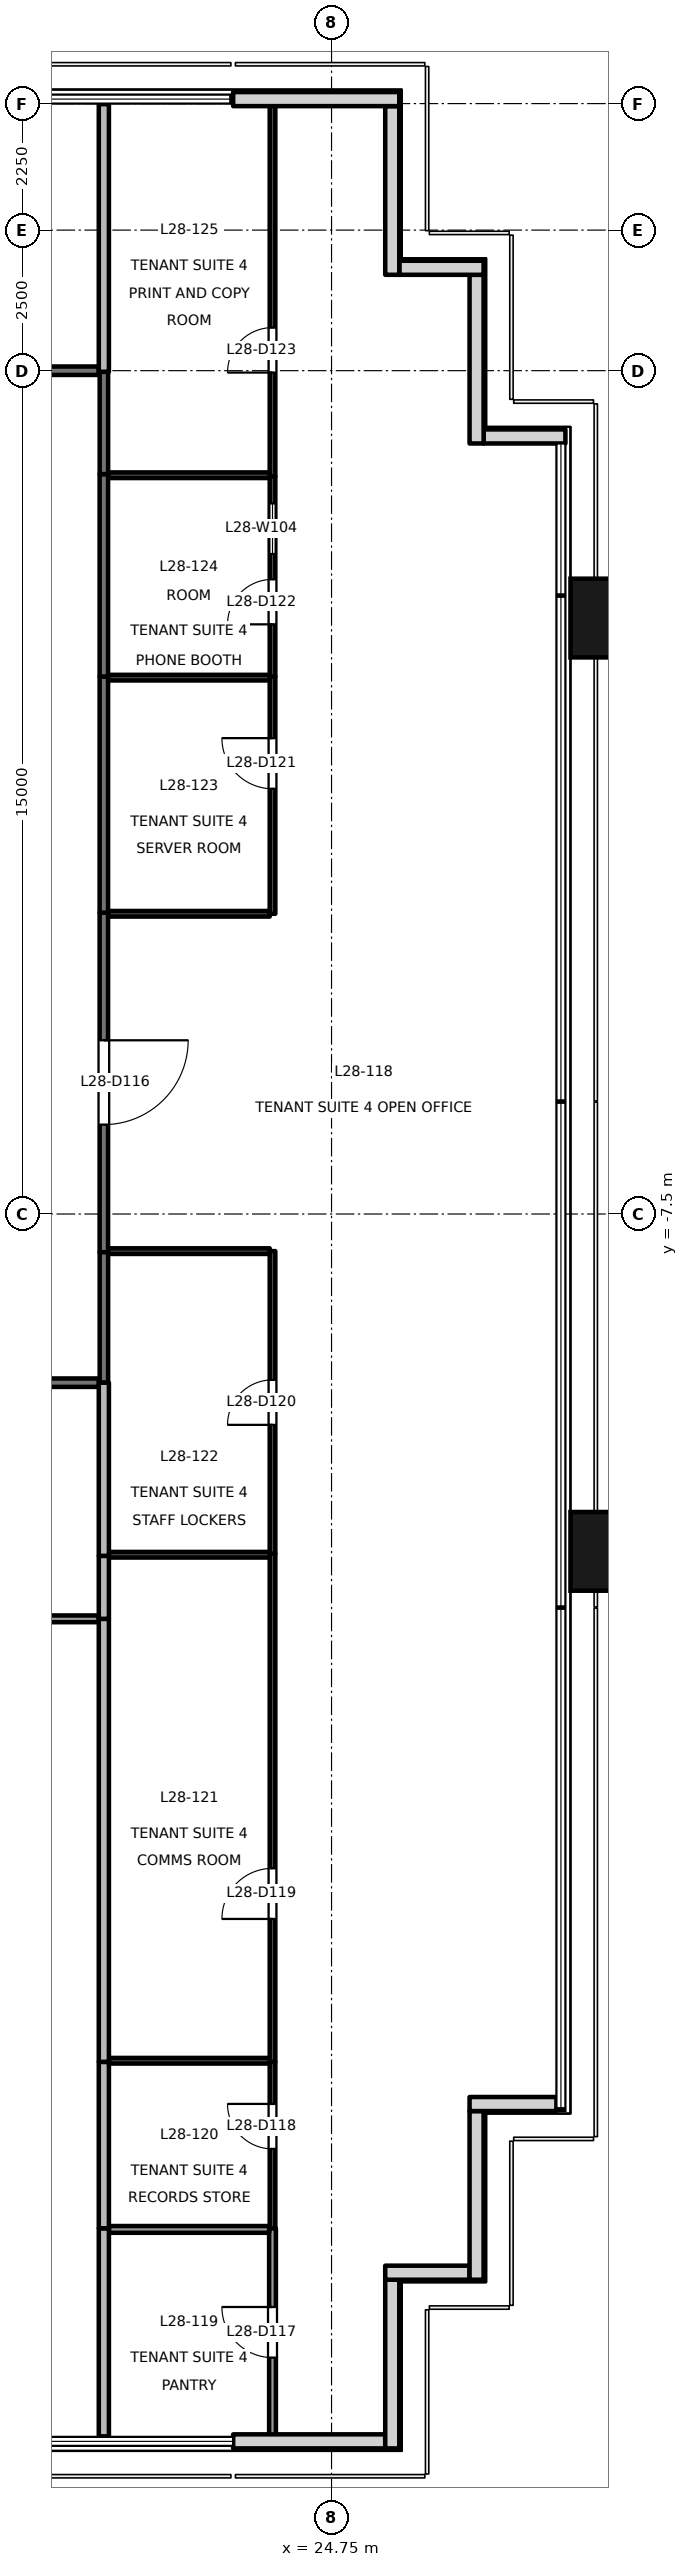
"""IFC4 building model, lengths in metres.
Left out: names, types, materials, properties, quantities, classifications, styles, units other than length and angle.
Written with IfcOpenShell. Run it as: python <this file> out.ifc"""

import sys

from ifc_helpers import new_model, si_unit, direction, frame, frame_2d, origin, origin_2d, place, context, subcontext, project, spatial, rectangle, extrude, element, fill, save


model = new_model("IFC4")
c1 = context("Model", 3, precision=1e-05, world=origin(), true_north=direction((0.0, 1.0)))
c2 = subcontext(c1, "Body", "Model", "MODEL_VIEW")
j1 = project(units=[si_unit("LENGTHUNIT", "METRE"), si_unit("PLANEANGLEUNIT", "RADIAN")], contexts=[c1])
p1 = place(None, origin())
s1 = spatial("IfcSite", under=j1, at=p1, CompositionType="ELEMENT")
p2 = place(p1, origin())
s2 = spatial("IfcBuilding", under=s1, at=p2, CompositionType="ELEMENT")
p3 = place(p2, frame((0.0, 0.0, 126.1)))
s3 = spatial("IfcBuildingStorey", under=s2, at=p3, CompositionType="ELEMENT", Elevation=126.1)
for number, where, z_axis, x_axis in (
    (1, (29.9, -13.5, -0.2), (0.0, 0.0, 1.0), (0.0, 1.0, 0.0)),
    (2, (29.9, 3.1, -0.2), (0.0, 0.0, 1.0), (0.0, 1.0, 0.0)),
):
    element("IfcColumn", number, at=place(p3, frame(where, z_axis=z_axis, x_axis=x_axis)), inside=s3, PredefinedType="COLUMN", context=c2, shape_type="SweptSolid", body=[
        extrude(rectangle(XDim=1.4, YDim=1.8, at=origin_2d()), origin(), (0.0, 0.0, 1.0), 4.0),
    ])
p4 = place(p3, frame((23.0, -29.33, 0.0), z_axis=(0.0, 0.0, 1.0), x_axis=(1.0, 0.0, 0.0)))
e3 = element("IfcWall", 3, at=p4, inside=s3, PredefinedType="SOLIDWALL", context=c2, shape_type="SweptSolid", body=[
    extrude(rectangle(XDim=2.705, YDim=0.25, at=frame_2d((1.353, 0.0))), origin(), (0.0, 0.0, 1.0), 3.8),
])
p5 = place(p3, frame((25.83, -29.455, 0.0), z_axis=(0.0, 0.0, 1.0), x_axis=(0.0, 1.0, 0.0)))
e4 = element("IfcWall", 4, at=p5, inside=s3, PredefinedType="SOLIDWALL", context=c2, shape_type="SweptSolid", body=[
    extrude(rectangle(XDim=3.0, YDim=0.25, at=frame_2d((1.5, 0.0))), origin(), (0.0, 0.0, 1.0), 3.8),
])
p6 = place(p3, frame((25.705, -26.33, 0.0), z_axis=(0.0, 0.0, 1.0), x_axis=(1.0, 0.0, 0.0)))
e5 = element("IfcWall", 5, at=p6, inside=s3, PredefinedType="SOLIDWALL", context=c2, shape_type="SweptSolid", body=[
    extrude(rectangle(XDim=1.5, YDim=0.25, at=frame_2d((0.75, 0.0))), origin(), (0.0, 0.0, 1.0), 3.8),
])
p7 = place(p3, frame((27.33, -26.455, 0.0), z_axis=(0.0, 0.0, 1.0), x_axis=(0.0, 1.0, 0.0)))
e6 = element("IfcWall", 6, at=p7, inside=s3, PredefinedType="SOLIDWALL", context=c2, shape_type="SweptSolid", body=[
    extrude(rectangle(XDim=3.0, YDim=0.25, at=frame_2d((1.5, 0.0))), origin(), (0.0, 0.0, 1.0), 3.8),
])
p8 = place(p3, frame((27.205, -23.33, 0.0), z_axis=(0.0, 0.0, 1.0), x_axis=(1.0, 0.0, 0.0)))
e7 = element("IfcWall", 7, at=p8, inside=s3, PredefinedType="SOLIDWALL", context=c2, shape_type="SweptSolid", body=[
    extrude(rectangle(XDim=1.545, YDim=0.25, at=frame_2d((0.772, 0.0))), origin(), (0.0, 0.0, 1.0), 3.8),
])
p9 = place(p3, frame((28.91, 6.33, 0.0), z_axis=(0.0, 0.0, 1.0), x_axis=(-1.0, 0.0, 0.0)))
e8 = element("IfcWall", 8, at=p9, inside=s3, PredefinedType="SOLIDWALL", context=c2, shape_type="SweptSolid", body=[
    extrude(rectangle(XDim=1.455, YDim=0.25, at=frame_2d((0.728, 0.0))), origin(), (0.0, 0.0, 1.0), 3.8),
])
p10 = place(p3, frame((27.33, 6.205, 0.0), z_axis=(0.0, 0.0, 1.0), x_axis=(0.0, 1.0, 0.0)))
e9 = element("IfcWall", 9, at=p10, inside=s3, PredefinedType="SOLIDWALL", context=c2, shape_type="SweptSolid", body=[
    extrude(rectangle(XDim=3.0, YDim=0.25, at=frame_2d((1.5, 0.0))), origin(), (0.0, 0.0, 1.0), 3.8),
])
p11 = place(p3, frame((27.455, 9.33, 0.0), z_axis=(0.0, 0.0, 1.0), x_axis=(-1.0, 0.0, 0.0)))
e10 = element("IfcWall", 10, at=p11, inside=s3, PredefinedType="SOLIDWALL", context=c2, shape_type="SweptSolid", body=[
    extrude(rectangle(XDim=1.5, YDim=0.25, at=frame_2d((0.75, 0.0))), origin(), (0.0, 0.0, 1.0), 3.8),
])
p12 = place(p3, frame((25.83, 9.205, 0.0), z_axis=(0.0, 0.0, 1.0), x_axis=(0.0, 1.0, 0.0)))
e11 = element("IfcWall", 11, at=p12, inside=s3, PredefinedType="SOLIDWALL", context=c2, shape_type="SweptSolid", body=[
    extrude(rectangle(XDim=3.0, YDim=0.25, at=frame_2d((1.5, 0.0))), origin(), (0.0, 0.0, 1.0), 3.8),
])
p13 = place(p3, frame((25.955, 12.33, 0.0), z_axis=(0.0, 0.0, 1.0), x_axis=(-1.0, 0.0, 0.0)))
e12 = element("IfcWall", 12, at=p13, inside=s3, PredefinedType="SOLIDWALL", context=c2, shape_type="SweptSolid", body=[
    extrude(rectangle(XDim=2.955, YDim=0.25, at=frame_2d((1.478, 0.0))), origin(), (0.0, 0.0, 1.0), 3.8),
])
p14 = place(p3, frame((20.61, -10.5, 0.0), z_axis=(0.0, 0.0, 1.0), x_axis=(-1.0, 0.0, 0.0)))
e13 = element("IfcWall", 13, at=p14, inside=s3, PredefinedType="PARTITIONING", context=c2, shape_type="SweptSolid", body=[
    extrude(rectangle(XDim=8.463, YDim=0.15, at=frame_2d((4.231, 0.0))), origin(), (0.0, 0.0, 1.0), 2.9),
])
p15 = place(p3, frame((20.7, -2.14, 0.0), z_axis=(0.0, 0.0, 1.0), x_axis=(0.0, -1.0, 0.0)))
e14 = element("IfcWall", 14, at=p15, inside=s3, PredefinedType="PARTITIONING", context=c2, shape_type="SweptSolid", body=[
    extrude(rectangle(XDim=6.04, YDim=0.15, at=frame_2d((3.02, 0.0))), origin(), (0.0, 0.0, 1.0), 3.3),
])
p16 = place(p15, frame((2.27, 0.0, 0.0)))
e15 = element("IfcOpeningElement", 15, at=p16, cuts=e14, PredefinedType="OPENING", context=c2, shape_type="SweptSolid", body=[
    extrude(rectangle(XDim=1.5, YDim=2.1, at=frame_2d((0.75, 1.05))), frame((0.0, 0.085, 0.0), z_axis=(0.0, -1.0, 0.0), x_axis=(1.0, 0.0, 0.0)), (0.0, 0.0, 1.0), 0.171),
])
p17 = place(p3, frame((20.701, -8.18, 0.0), z_axis=(0.0, 0.0, 1.0), x_axis=(0.0, -1.0, 0.0)))
e16 = element("IfcWall", 16, at=p17, inside=s3, PredefinedType="PARTITIONING", context=c2, shape_type="SweptSolid", body=[
    extrude(rectangle(XDim=2.32, YDim=0.15, at=frame_2d((1.16, 0.0))), origin(), (0.0, 0.0, 1.0), 3.8),
])
p18 = place(p3, frame((20.7, 2.06, 0.0), z_axis=(0.0, 0.0, 1.0), x_axis=(0.0, -1.0, 0.0)))
e17 = element("IfcWall", 17, at=p18, inside=s3, PredefinedType="PARTITIONING", context=c2, shape_type="SweptSolid", body=[
    extrude(rectangle(XDim=4.2, YDim=0.15, at=frame_2d((2.1, 0.0))), origin(), (0.0, 0.0, 1.0), 3.3),
])
p19 = place(p3, frame((20.7, 5.66, 0.0), z_axis=(0.0, 0.0, 1.0), x_axis=(0.0, -1.0, 0.0)))
e18 = element("IfcWall", 18, at=p19, inside=s3, PredefinedType="PARTITIONING", context=c2, shape_type="SweptSolid", body=[
    extrude(rectangle(XDim=3.6, YDim=0.15, at=frame_2d((1.8, 0.0))), origin(), (0.0, 0.0, 1.0), 3.3),
])
p20 = place(p3, frame((20.701, 7.48, 0.0), z_axis=(0.0, 0.0, 1.0), x_axis=(0.0, -1.0, 0.0)))
e19 = element("IfcWall", 19, at=p20, inside=s3, PredefinedType="PARTITIONING", context=c2, shape_type="SweptSolid", body=[
    extrude(rectangle(XDim=1.82, YDim=0.15, at=frame_2d((0.91, 0.0))), origin(), (0.0, 0.0, 1.0), 3.8),
])
p21 = place(p3, frame((18.0, 7.499, 0.0), z_axis=(0.0, 0.0, 1.0), x_axis=(1.0, 0.0, 0.0)))
e20 = element("IfcWall", 20, at=p21, inside=s3, PredefinedType="PARTITIONING", context=c2, shape_type="SweptSolid", body=[
    extrude(rectangle(XDim=2.61, YDim=0.15, at=frame_2d((1.305, 0.0))), origin(), (0.0, 0.0, 1.0), 3.8),
])
p22 = place(p3, frame((12.167, -14.7, 0.0), z_axis=(0.0, 0.0, 1.0), x_axis=(1.0, 0.0, 0.0)))
e21 = element("IfcWall", 21, at=p22, inside=s3, PredefinedType="PARTITIONING", context=c2, shape_type="SweptSolid", body=[
    extrude(rectangle(XDim=8.443, YDim=0.12, at=frame_2d((4.222, 0.0))), origin(), (0.0, 0.0, 1.0), 2.9),
])
p23 = place(p22, frame((3.771, 0.0, 0.0)))
e22 = element("IfcOpeningElement", 22, at=p23, cuts=e21, PredefinedType="OPENING", context=c2, shape_type="SweptSolid", body=[
    extrude(rectangle(XDim=0.9, YDim=2.1, at=frame_2d((0.45, 1.05))), frame((0.0, 0.071, 0.0), z_axis=(0.0, -1.0, 0.0), x_axis=(1.0, 0.0, 0.0)), (0.0, 0.0, 1.0), 0.141),
])
p24 = place(p3, frame((20.7, -25.54, 0.0), z_axis=(0.0, 0.0, 1.0), x_axis=(0.0, -1.0, 0.0)))
e23 = element("IfcWall", 23, at=p24, inside=s3, PredefinedType="PARTITIONING", context=c2, shape_type="SweptSolid", body=[
    extrude(rectangle(XDim=3.7, YDim=0.18, at=frame_2d((1.85, 0.0))), origin(), (0.0, 0.0, 1.0), 3.8),
])
p25 = place(p3, frame((20.7, -22.58, 0.0), z_axis=(0.0, 0.0, 1.0), x_axis=(0.0, -1.0, 0.0)))
e24 = element("IfcWall", 24, at=p25, inside=s3, PredefinedType="PARTITIONING", context=c2, shape_type="SweptSolid", body=[
    extrude(rectangle(XDim=2.96, YDim=0.18, at=frame_2d((1.48, 0.0))), origin(), (0.0, 0.0, 1.0), 3.8),
])
p26 = place(p3, frame((20.7, -14.7, 0.0), z_axis=(0.0, 0.0, 1.0), x_axis=(0.0, -1.0, 0.0)))
e25 = element("IfcWall", 25, at=p26, inside=s3, PredefinedType="PARTITIONING", context=c2, shape_type="SweptSolid", body=[
    extrude(rectangle(XDim=7.88, YDim=0.18, at=frame_2d((3.94, 0.0))), origin(), (0.0, 0.0, 1.0), 3.8),
])
p27 = place(p3, frame((20.7, -13.58, 0.0), z_axis=(0.0, 0.0, 1.0), x_axis=(0.0, -1.0, 0.0)))
e26 = element("IfcWall", 26, at=p27, inside=s3, PredefinedType="PARTITIONING", context=c2, shape_type="SweptSolid", body=[
    extrude(rectangle(XDim=1.12, YDim=0.18, at=frame_2d((0.56, 0.0))), origin(), (0.0, 0.0, 1.0), 3.8),
])
p28 = place(p3, frame((20.7, -10.5, 0.0), z_axis=(0.0, 0.0, 1.0), x_axis=(0.0, -1.0, 0.0)))
e27 = element("IfcWall", 27, at=p28, inside=s3, PredefinedType="PARTITIONING", context=c2, shape_type="SweptSolid", body=[
    extrude(rectangle(XDim=3.08, YDim=0.18, at=frame_2d((1.54, 0.0))), origin(), (0.0, 0.0, 1.0), 3.8),
])
p29 = place(p3, frame((23.7, -29.24, 0.0), z_axis=(0.0, 0.0, 1.0), x_axis=(0.0, 1.0, 0.0)))
e28 = element("IfcWall", 28, at=p29, inside=s3, PredefinedType="PARTITIONING", context=c2, shape_type="SweptSolid", body=[
    extrude(rectangle(XDim=3.7, YDim=0.12, at=frame_2d((1.85, 0.0))), origin(), (0.0, 0.0, 1.0), 3.8),
])
p30 = place(p29, frame((1.4, 0.0, 0.0)))
e29 = element("IfcOpeningElement", 29, at=p30, cuts=e28, PredefinedType="OPENING", context=c2, shape_type="SweptSolid", body=[
    extrude(rectangle(XDim=0.9, YDim=2.1, at=frame_2d((0.45, 1.05))), frame((0.0, 0.071, 0.0), z_axis=(0.0, -1.0, 0.0), x_axis=(1.0, 0.0, 0.0)), (0.0, 0.0, 1.0), 0.141),
])
p31 = place(p3, frame((23.7, -25.54, 0.0), z_axis=(0.0, 0.0, 1.0), x_axis=(0.0, 1.0, 0.0)))
e30 = element("IfcWall", 30, at=p31, inside=s3, PredefinedType="PARTITIONING", context=c2, shape_type="SweptSolid", body=[
    extrude(rectangle(XDim=2.96, YDim=0.1, at=frame_2d((1.48, 0.0))), origin(), (0.0, 0.0, 1.0), 3.8),
])
p32 = place(p31, frame((1.412, 0.0, 0.0)))
e31 = element("IfcOpeningElement", 31, at=p32, cuts=e30, PredefinedType="OPENING", context=c2, shape_type="SweptSolid", body=[
    extrude(rectangle(XDim=0.8, YDim=2.1, at=frame_2d((0.4, 1.05))), frame((0.0, 0.061, 0.0), z_axis=(0.0, -1.0, 0.0), x_axis=(1.0, 0.0, 0.0)), (0.0, 0.0, 1.0), 0.121),
])
p33 = place(p3, frame((23.7, -22.58, 0.0), z_axis=(0.0, 0.0, 1.0), x_axis=(0.0, 1.0, 0.0)))
e32 = element("IfcWall", 32, at=p33, inside=s3, PredefinedType="PARTITIONING", context=c2, shape_type="SweptSolid", body=[
    extrude(rectangle(XDim=9.04, YDim=0.1, at=frame_2d((4.52, 0.0))), origin(), (0.0, 0.0, 1.0), 3.8),
])
p34 = place(p33, frame((2.542, 0.0, 0.0)))
e33 = element("IfcOpeningElement", 33, at=p34, cuts=e32, PredefinedType="OPENING", context=c2, shape_type="SweptSolid", body=[
    extrude(rectangle(XDim=0.9, YDim=2.1, at=frame_2d((0.45, 1.05))), frame((0.0, 0.061, 0.0), z_axis=(0.0, -1.0, 0.0), x_axis=(1.0, 0.0, 0.0)), (0.0, 0.0, 1.0), 0.121),
])
p35 = place(p3, frame((23.65, -8.16, 0.0), z_axis=(0.0, 0.0, 1.0), x_axis=(-1.0, 0.0, 0.0)))
e34 = element("IfcWall", 34, at=p35, inside=s3, PredefinedType="PARTITIONING", context=c2, shape_type="SweptSolid", body=[
    extrude(rectangle(XDim=2.875, YDim=0.1, at=frame_2d((1.438, 0.0))), origin(), (0.0, 0.0, 1.0), 3.8),
])
p36 = place(p3, frame((23.7, -13.54, 0.0), z_axis=(0.0, 0.0, 1.0), x_axis=(0.0, 1.0, 0.0)))
e35 = element("IfcWall", 35, at=p36, inside=s3, PredefinedType="PARTITIONING", context=c2, shape_type="SweptSolid", body=[
    extrude(rectangle(XDim=5.38, YDim=0.1, at=frame_2d((2.69, 0.0))), origin(), (0.0, 0.0, 1.0), 3.8),
])
p37 = place(p36, frame((2.29, 0.0, 0.0)))
e36 = element("IfcOpeningElement", 36, at=p37, cuts=e35, PredefinedType="OPENING", context=c2, shape_type="SweptSolid", body=[
    extrude(rectangle(XDim=0.8, YDim=2.1, at=frame_2d((0.4, 1.05))), frame((0.0, 0.061, 0.0), z_axis=(0.0, -1.0, 0.0), x_axis=(1.0, 0.0, 0.0)), (0.0, 0.0, 1.0), 0.121),
])
p38 = place(p3, frame((20.775, -2.16, 0.0), z_axis=(0.0, 0.0, 1.0), x_axis=(1.0, 0.0, 0.0)))
e37 = element("IfcWall", 37, at=p38, inside=s3, PredefinedType="PARTITIONING", context=c2, shape_type="SweptSolid", body=[
    extrude(rectangle(XDim=2.875, YDim=0.1, at=frame_2d((1.438, 0.0))), origin(), (0.0, 0.0, 1.0), 3.8),
])
p39 = place(p3, frame((23.7, -2.16, 0.0), z_axis=(0.0, 0.0, 1.0), x_axis=(0.0, 1.0, 0.0)))
e38 = element("IfcWall", 38, at=p39, inside=s3, PredefinedType="PARTITIONING", context=c2, shape_type="SweptSolid", body=[
    extrude(rectangle(XDim=4.22, YDim=0.1, at=frame_2d((2.11, 0.0))), origin(), (0.0, 0.0, 1.0), 3.3),
])
p40 = place(p39, frame((2.224, 0.0, 0.0)))
e39 = element("IfcOpeningElement", 39, at=p40, cuts=e38, PredefinedType="OPENING", context=c2, shape_type="SweptSolid", body=[
    extrude(rectangle(XDim=0.9, YDim=2.1, at=frame_2d((0.45, 1.05))), frame((0.0, 0.061, 0.0), z_axis=(0.0, -1.0, 0.0), x_axis=(1.0, 0.0, 0.0)), (0.0, 0.0, 1.0), 0.121),
])
p41 = place(p3, frame((23.7, 2.06, 0.0), z_axis=(0.0, 0.0, 1.0), x_axis=(0.0, 1.0, 0.0)))
e40 = element("IfcWall", 40, at=p41, inside=s3, PredefinedType="PARTITIONING", context=c2, shape_type="SweptSolid", body=[
    extrude(rectangle(XDim=3.56, YDim=0.1, at=frame_2d((1.78, 0.0))), origin(), (0.0, 0.0, 1.0), 3.3),
])
p42 = place(p41, frame((0.928, 0.0, 0.0)))
e41 = element("IfcOpeningElement", 41, at=p42, cuts=e40, PredefinedType="OPENING", context=c2, shape_type="SweptSolid", body=[
    extrude(rectangle(XDim=0.8, YDim=2.1, at=frame_2d((0.4, 1.05))), frame((0.0, 0.061, 0.0), z_axis=(0.0, -1.0, 0.0), x_axis=(1.0, 0.0, 0.0)), (0.0, 0.0, 1.0), 0.121),
])
p43 = place(p41, frame((2.179, 0.0, 0.9)))
e42 = element("IfcOpeningElement", 42, at=p43, cuts=e40, PredefinedType="OPENING", context=c2, shape_type="SweptSolid", body=[
    extrude(rectangle(XDim=0.9, YDim=1.2, at=frame_2d((0.45, 0.6))), frame((0.0, 0.061, 0.0), z_axis=(0.0, -1.0, 0.0), x_axis=(1.0, 0.0, 0.0)), (0.0, 0.0, 1.0), 0.121),
])
p44 = place(p3, frame((23.7, 5.62, 0.0), z_axis=(0.0, 0.0, 1.0), x_axis=(0.0, 1.0, 0.0)))
e43 = element("IfcWall", 43, at=p44, inside=s3, PredefinedType="PARTITIONING", context=c2, shape_type="SweptSolid", body=[
    extrude(rectangle(XDim=6.62, YDim=0.1, at=frame_2d((3.31, 0.0))), origin(), (0.0, 0.0, 1.0), 3.8),
])
p45 = place(p44, frame((1.846, 0.0, 0.0)))
e44 = element("IfcOpeningElement", 44, at=p45, cuts=e43, PredefinedType="OPENING", context=c2, shape_type="SweptSolid", body=[
    extrude(rectangle(XDim=0.8, YDim=2.1, at=frame_2d((0.4, 1.05))), frame((0.0, 0.061, 0.0), z_axis=(0.0, -1.0, 0.0), x_axis=(1.0, 0.0, 0.0)), (0.0, 0.0, 1.0), 0.121),
])
p46 = place(p3, frame((20.79, -25.56, 0.0), z_axis=(0.0, 0.0, 1.0), x_axis=(1.0, 0.0, 0.0)))
e45 = element("IfcWall", 45, at=p46, inside=s3, PredefinedType="PARTITIONING", context=c2, shape_type="SweptSolid", body=[
    extrude(rectangle(XDim=2.85, YDim=0.12, at=frame_2d((1.425, 0.0))), origin(), (0.0, 0.0, 1.0), 3.8),
])
for number, where, z_axis, x_axis in (
    (46, (20.79, -22.56, 0.0), (0.0, 0.0, 1.0), (1.0, 0.0, 0.0)),
    (47, (20.79, -13.56, 0.0), (0.0, 0.0, 1.0), (1.0, 0.0, 0.0)),
):
    element("IfcWall", number, at=place(p3, frame(where, z_axis=z_axis, x_axis=x_axis)), inside=s3, PredefinedType="PARTITIONING", context=c2, shape_type="SweptSolid", body=[
        extrude(rectangle(XDim=2.86, YDim=0.1, at=frame_2d((1.43, 0.0))), origin(), (0.0, 0.0, 1.0), 3.8),
    ])
for number, where, z_axis, x_axis in (
    (48, (20.775, 2.04, 0.0), (0.0, 0.0, 1.0), (1.0, 0.0, 0.0)),
    (49, (20.775, 5.64, 0.0), (0.0, 0.0, 1.0), (1.0, 0.0, 0.0)),
):
    element("IfcWall", number, at=place(p3, frame(where, z_axis=z_axis, x_axis=x_axis)), inside=s3, PredefinedType="PARTITIONING", context=c2, shape_type="SweptSolid", body=[
        extrude(rectangle(XDim=2.875, YDim=0.1, at=frame_2d((1.438, 0.0))), origin(), (0.0, 0.0, 1.0), 3.8),
    ])
p47 = place(p3, frame((20.7, 7.48, 0.0), z_axis=(0.0, 0.0, 1.0), x_axis=(0.0, 1.0, 0.0)))
e50 = element("IfcWall", 50, at=p47, inside=s3, PredefinedType="PARTITIONING", context=c2, shape_type="SweptSolid", body=[
    extrude(rectangle(XDim=4.76, YDim=0.18, at=frame_2d((2.38, 0.0))), origin(), (0.0, 0.0, 1.0), 3.8),
])
p48 = place(p16, origin())
e51 = element("IfcDoor", 51, at=p48, inside=s3, OperationType="DOUBLE_DOOR_SINGLE_SWING", PredefinedType="DOOR", context=c2, shape_type="SweptSolid", body=[
    extrude(rectangle(XDim=1.5, YDim=2.1, at=frame_2d((0.75, 1.05))), frame((0.0, 0.025, 0.0), z_axis=(0.0, -1.0, 0.0), x_axis=(1.0, 0.0, 0.0)), (0.0, 0.0, 1.0), 0.05),
])
fill(e15, e51)
p49 = place(p30, origin())
e52 = element("IfcDoor", 52, at=p49, inside=s3, OperationType="SINGLE_SWING_RIGHT", PredefinedType="DOOR", context=c2, shape_type="SweptSolid", body=[
    extrude(rectangle(XDim=0.9, YDim=2.1, at=frame_2d((0.45, 1.05))), frame((0.0, 0.025, 0.0), z_axis=(0.0, -1.0, 0.0), x_axis=(1.0, 0.0, 0.0)), (0.0, 0.0, 1.0), 0.05),
])
fill(e29, e52)
p50 = place(p32, origin())
e53 = element("IfcDoor", 53, at=p50, inside=s3, OperationType="SINGLE_SWING_RIGHT", PredefinedType="DOOR", context=c2, shape_type="SweptSolid", body=[
    extrude(rectangle(XDim=0.8, YDim=2.1, at=frame_2d((0.4, 1.05))), frame((0.0, 0.025, 0.0), z_axis=(0.0, -1.0, 0.0), x_axis=(1.0, 0.0, 0.0)), (0.0, 0.0, 1.0), 0.05),
])
fill(e31, e53)
p51 = place(p34, origin())
e54 = element("IfcDoor", 54, at=p51, inside=s3, OperationType="SINGLE_SWING_LEFT", PredefinedType="DOOR", context=c2, shape_type="SweptSolid", body=[
    extrude(rectangle(XDim=0.9, YDim=2.1, at=frame_2d((0.45, 1.05))), frame((0.0, 0.025, 0.0), z_axis=(0.0, -1.0, 0.0), x_axis=(1.0, 0.0, 0.0)), (0.0, 0.0, 1.0), 0.05),
])
fill(e33, e54)
p52 = place(p37, origin())
e55 = element("IfcDoor", 55, at=p52, inside=s3, OperationType="SINGLE_SWING_LEFT", PredefinedType="DOOR", context=c2, shape_type="SweptSolid", body=[
    extrude(rectangle(XDim=0.8, YDim=2.1, at=frame_2d((0.4, 1.05))), frame((0.0, 0.025, 0.0), z_axis=(0.0, -1.0, 0.0), x_axis=(1.0, 0.0, 0.0)), (0.0, 0.0, 1.0), 0.05),
])
fill(e36, e55)
p53 = place(p40, origin())
e56 = element("IfcDoor", 56, at=p53, inside=s3, OperationType="SINGLE_SWING_RIGHT", PredefinedType="DOOR", context=c2, shape_type="SweptSolid", body=[
    extrude(rectangle(XDim=0.9, YDim=2.1, at=frame_2d((0.45, 1.05))), frame((0.0, 0.025, 0.0), z_axis=(0.0, -1.0, 0.0), x_axis=(1.0, 0.0, 0.0)), (0.0, 0.0, 1.0), 0.05),
])
fill(e39, e56)
p54 = place(p42, origin())
e57 = element("IfcDoor", 57, at=p54, inside=s3, OperationType="SINGLE_SWING_LEFT", PredefinedType="DOOR", context=c2, shape_type="SweptSolid", body=[
    extrude(rectangle(XDim=0.8, YDim=2.1, at=frame_2d((0.4, 1.05))), frame((0.0, 0.025, 0.0), z_axis=(0.0, -1.0, 0.0), x_axis=(1.0, 0.0, 0.0)), (0.0, 0.0, 1.0), 0.05),
])
fill(e41, e57)
p55 = place(p45, origin())
e58 = element("IfcDoor", 58, at=p55, inside=s3, OperationType="SINGLE_SWING_LEFT", PredefinedType="DOOR", context=c2, shape_type="SweptSolid", body=[
    extrude(rectangle(XDim=0.8, YDim=2.1, at=frame_2d((0.4, 1.05))), frame((0.0, 0.025, 0.0), z_axis=(0.0, -1.0, 0.0), x_axis=(1.0, 0.0, 0.0)), (0.0, 0.0, 1.0), 0.05),
])
fill(e44, e58)
p56 = place(p43, origin())
e59 = element("IfcWindow", 59, at=p56, inside=s3, PartitioningType="SINGLE_PANEL", PredefinedType="WINDOW", context=c2, shape_type="SweptSolid", body=[
    extrude(rectangle(XDim=0.9, YDim=1.2, at=frame_2d((0.45, 0.6))), frame((0.0, 0.03, 0.0), z_axis=(0.0, -1.0, 0.0), x_axis=(1.0, 0.0, 0.0)), (0.0, 0.0, 1.0), 0.06),
])
fill(e42, e59)
save(model, sys.argv[1])
